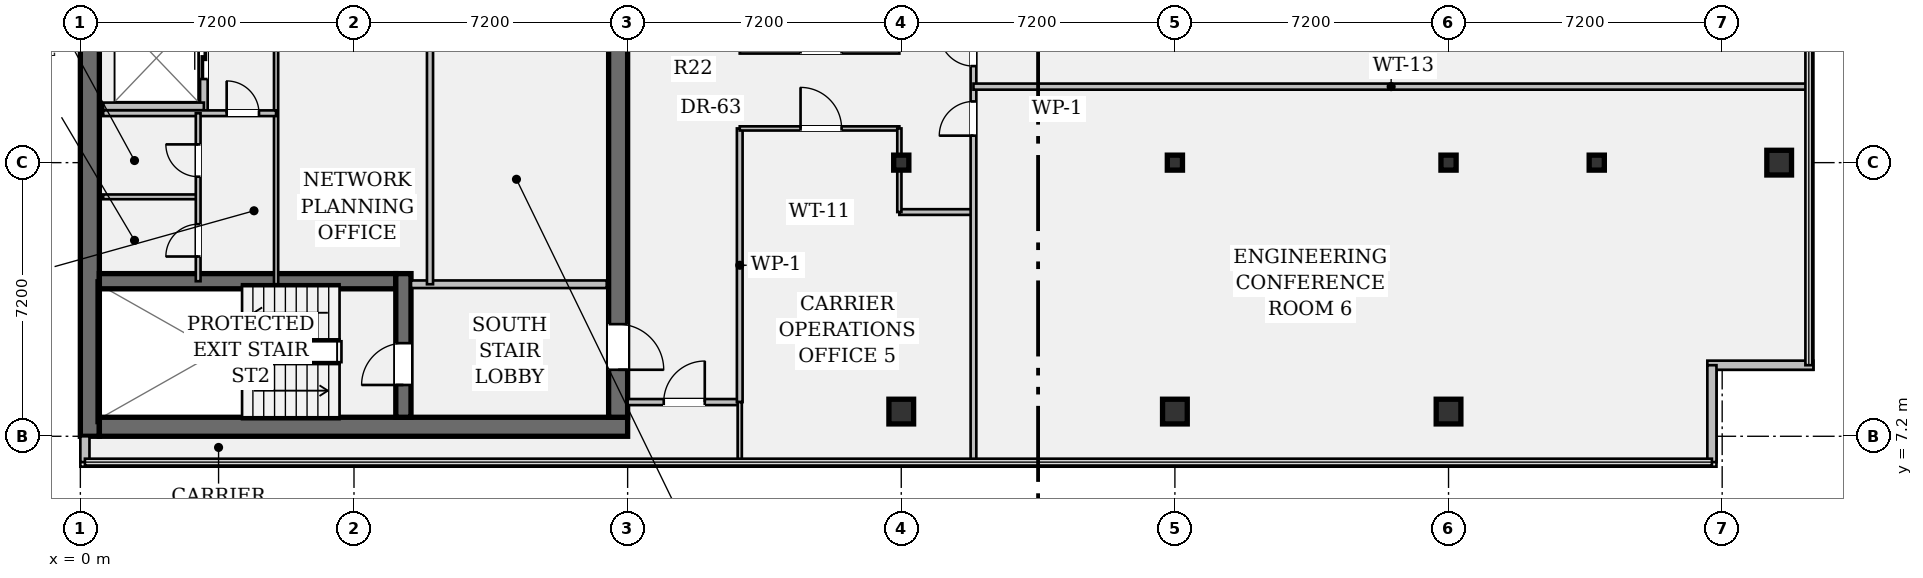
"""IFC4 building model, lengths in metres.
Left out: names, types, materials, properties, quantities, classifications, styles, units other than length and angle.
Written with IfcOpenShell. Run it as: python <this file> out.ifc"""

import sys

from ifc_helpers import new_model, si_unit, direction, frame, frame_2d, origin, origin_2d, place, context, subcontext, project, spatial, rectangle, hollow_rectangle, i_section, extrude, element, fill, save


model = new_model("IFC4")
c1 = context("Model", 3, precision=1e-05, world=origin(), true_north=direction((0.0, 1.0)))
c2 = subcontext(c1, "Body", "Model", "MODEL_VIEW")
j1 = project(units=[si_unit("LENGTHUNIT", "METRE"), si_unit("PLANEANGLEUNIT", "RADIAN")], contexts=[c1])
p1 = place(None, origin())
s1 = spatial("IfcSite", under=j1, at=p1, CompositionType="ELEMENT")
p2 = place(p1, origin())
s2 = spatial("IfcBuilding", under=s1, at=p2, CompositionType="ELEMENT")
p3 = place(p2, frame((0.0, 0.0, 251.65)))
s3 = spatial("IfcBuildingStorey", under=s2, at=p3, CompositionType="ELEMENT", Elevation=251.65)
p4 = place(p3, frame((0.25, 7.2, 0.0), z_axis=(0.0, 0.0, 1.0), x_axis=(0.0, 1.0, 0.0)))
e1 = element("IfcWall", 1, at=p4, inside=s3, PredefinedType="SHEAR", context=c2, shape_type="SweptSolid", body=[
    extrude(rectangle(XDim=28.8, YDim=0.5, at=frame_2d((14.4, 0.0))), origin(), (0.0, 0.0, 1.0), 3.24),
])
p5 = place(p3, frame((0.5, 7.45, 0.0), z_axis=(0.0, 0.0, 1.0), x_axis=(1.0, 0.0, 0.0)))
e2 = element("IfcWall", 2, at=p5, inside=s3, PredefinedType="SHEAR", context=c2, shape_type="SweptSolid", body=[
    extrude(rectangle(XDim=13.9, YDim=0.5, at=frame_2d((6.95, 0.0))), origin(), (0.0, 0.0, 1.0), 3.24),
])
p6 = place(p3, frame((14.15, 35.5, 0.0), z_axis=(0.0, 0.0, 1.0), x_axis=(0.0, -1.0, 0.0)))
e3 = element("IfcWall", 3, at=p6, inside=s3, PredefinedType="SHEAR", context=c2, shape_type="SweptSolid", body=[
    extrude(rectangle(XDim=27.8, YDim=0.5, at=frame_2d((13.9, 0.0))), origin(), (0.0, 0.0, 1.0), 3.24),
])
p7 = place(p6, frame((1.4, 0.0, 0.0)))
e4 = element("IfcOpeningElement", 4, at=p7, cuts=e3, PredefinedType="OPENING", context=c2, shape_type="SweptSolid", body=[
    extrude(rectangle(XDim=1.2, YDim=2.15, at=frame_2d((0.6, 1.075))), frame((0.0, 0.262, 0.0), z_axis=(0.0, -1.0, 0.0), x_axis=(1.0, 0.0, 0.0)), (0.0, 0.0, 1.0), 0.524),
])
p8 = place(p6, frame((25.35, 0.0, 0.0)))
e5 = element("IfcOpeningElement", 5, at=p8, cuts=e3, PredefinedType="OPENING", context=c2, shape_type="SweptSolid", body=[
    extrude(rectangle(XDim=1.2, YDim=2.15, at=frame_2d((0.6, 1.075))), frame((0.0, 0.262, 0.0), z_axis=(0.0, -1.0, 0.0), x_axis=(1.0, 0.0, 0.0)), (0.0, 0.0, 1.0), 0.524),
])
p9 = place(p6, frame((14.7, 0.0, 0.0)))
e6 = element("IfcOpeningElement", 6, at=p9, cuts=e3, PredefinedType="OPENING", context=c2, shape_type="SweptSolid", body=[
    extrude(rectangle(XDim=1.6, YDim=2.2, at=frame_2d((0.8, 1.1))), frame((0.0, 0.262, 0.0), z_axis=(0.0, -1.0, 0.0), x_axis=(1.0, 0.0, 0.0)), (0.0, 0.0, 1.0), 0.524),
])
p10 = place(p3, frame((0.5, 11.28, 0.0), z_axis=(0.0, 0.0, 1.0), x_axis=(1.0, 0.0, 0.0)))
e7 = element("IfcWall", 7, at=p10, inside=s3, PredefinedType="SHEAR", context=c2, shape_type="SweptSolid", body=[
    extrude(rectangle(XDim=7.8, YDim=0.4, at=frame_2d((3.9, 0.0))), origin(), (0.0, 0.0, 1.0), 3.24),
])
p11 = place(p3, frame((8.5, 7.7, 0.0), z_axis=(0.0, 0.0, 1.0), x_axis=(0.0, 1.0, 0.0)))
e8 = element("IfcWall", 8, at=p11, inside=s3, PredefinedType="SHEAR", context=c2, shape_type="SweptSolid", body=[
    extrude(rectangle(XDim=3.78, YDim=0.4, at=frame_2d((1.89, 0.0))), origin(), (0.0, 0.0, 1.0), 3.24),
])
p12 = place(p11, frame((0.85, 0.0, 0.0)))
e9 = element("IfcOpeningElement", 9, at=p12, cuts=e8, PredefinedType="OPENING", context=c2, shape_type="SweptSolid", body=[
    extrude(rectangle(XDim=1.1, YDim=2.15, at=frame_2d((0.55, 1.075))), frame((0.0, 0.212, 0.0), z_axis=(0.0, -1.0, 0.0), x_axis=(1.0, 0.0, 0.0)), (0.0, 0.0, 1.0), 0.424),
])
p13 = place(p3, frame((21.6, 7.85, 0.0), z_axis=(0.0, 0.0, 1.0), x_axis=(1.0, 0.0, 0.0)))
e10 = element("IfcColumn", 10, at=p13, inside=s3, PredefinedType="COLUMN", context=c2, shape_type="SweptSolid", body=[
    extrude(hollow_rectangle(XDim=0.65, YDim=0.65, WallThickness=0.04, at=origin_2d()), origin(), (0.0, 0.0, 1.0), 3.24),
])
p14 = place(p3, frame((21.6, 14.4, 0.0), z_axis=(0.0, 0.0, 1.0), x_axis=(1.0, 0.0, 0.0)))
e11 = element("IfcColumn", 11, at=p14, inside=s3, PredefinedType="COLUMN", context=c2, shape_type="SweptSolid", body=[
    extrude(i_section(OverallWidth=0.399, OverallDepth=0.394, WebThickness=0.023, FlangeThickness=0.037, FilletRadius=0.018, at=origin_2d()), origin(), (0.0, 0.0, 1.0), 3.24),
])
p15 = place(p3, frame((28.8, 7.85, 0.0), z_axis=(0.0, 0.0, 1.0), x_axis=(1.0, 0.0, 0.0)))
e12 = element("IfcColumn", 12, at=p15, inside=s3, PredefinedType="COLUMN", context=c2, shape_type="SweptSolid", body=[
    extrude(hollow_rectangle(XDim=0.65, YDim=0.65, WallThickness=0.04, at=origin_2d()), origin(), (0.0, 0.0, 1.0), 3.24),
])
p16 = place(p3, frame((28.8, 14.4, 0.0), z_axis=(0.0, 0.0, 1.0), x_axis=(1.0, 0.0, 0.0)))
e13 = element("IfcColumn", 13, at=p16, inside=s3, PredefinedType="COLUMN", context=c2, shape_type="SweptSolid", body=[
    extrude(i_section(OverallWidth=0.399, OverallDepth=0.394, WebThickness=0.023, FlangeThickness=0.037, FilletRadius=0.018, at=origin_2d()), origin(), (0.0, 0.0, 1.0), 3.24),
])
p17 = place(p3, frame((36.0, 7.85, 0.0), z_axis=(0.0, 0.0, 1.0), x_axis=(1.0, 0.0, 0.0)))
e14 = element("IfcColumn", 14, at=p17, inside=s3, PredefinedType="COLUMN", context=c2, shape_type="SweptSolid", body=[
    extrude(hollow_rectangle(XDim=0.65, YDim=0.65, WallThickness=0.04, at=origin_2d()), origin(), (0.0, 0.0, 1.0), 3.24),
])
for number, where, z_axis, x_axis in (
    (15, (36.0, 14.4, 0.0), (0.0, 0.0, 1.0), (1.0, 0.0, 0.0)),
    (16, (39.9, 14.4, 0.0), (0.0, 0.0, 1.0), (1.0, 0.0, 0.0)),
):
    element("IfcColumn", number, at=place(p3, frame(where, z_axis=z_axis, x_axis=x_axis)), inside=s3, PredefinedType="COLUMN", context=c2, shape_type="SweptSolid", body=[
        extrude(i_section(OverallWidth=0.399, OverallDepth=0.394, WebThickness=0.023, FlangeThickness=0.037, FilletRadius=0.018, at=origin_2d()), origin(), (0.0, 0.0, 1.0), 3.24),
    ])
p18 = place(p3, frame((44.7, 14.4, 0.0), z_axis=(0.0, 0.0, 1.0), x_axis=(1.0, 0.0, 0.0)))
e17 = element("IfcColumn", 17, at=p18, inside=s3, PredefinedType="COLUMN", context=c2, shape_type="SweptSolid", body=[
    extrude(hollow_rectangle(XDim=0.65, YDim=0.65, WallThickness=0.04, at=origin_2d()), origin(), (0.0, 0.0, 1.0), 3.24),
])
p19 = place(p3, frame((0.12, 6.52, 0.0), z_axis=(0.0, 0.0, 1.0), x_axis=(0.0, 1.0, 0.0)))
e18 = element("IfcWall", 18, at=p19, inside=s3, PredefinedType="STANDARD", context=c2, shape_type="SweptSolid", body=[
    extrude(rectangle(XDim=0.68, YDim=0.24, at=frame_2d((0.34, 0.0))), origin(), (0.0, 0.0, 1.0), 3.24),
])
p20 = place(p3, frame((45.6, 9.07, 0.0), z_axis=(0.0, 0.0, 1.0), x_axis=(-1.0, 0.0, 0.0)))
e19 = element("IfcWall", 19, at=p20, inside=s3, PredefinedType="STANDARD", context=c2, shape_type="SweptSolid", body=[
    extrude(rectangle(XDim=2.79, YDim=0.24, at=frame_2d((1.395, 0.0))), origin(), (0.0, 0.0, 1.0), 3.24),
])
p21 = place(p3, frame((42.93, 9.07, 0.0), z_axis=(0.0, 0.0, 1.0), x_axis=(0.0, -1.0, 0.0)))
e20 = element("IfcWall", 20, at=p21, inside=s3, PredefinedType="STANDARD", context=c2, shape_type="SweptSolid", body=[
    extrude(rectangle(XDim=2.55, YDim=0.24, at=frame_2d((1.275, 0.0))), origin(), (0.0, 0.0, 1.0), 3.24),
])
p22 = place(p3, frame((8.7, 11.2, 0.0), z_axis=(0.0, 0.0, 1.0), x_axis=(1.0, 0.0, 0.0)))
e21 = element("IfcWall", 21, at=p22, inside=s3, PredefinedType="PARTITIONING", context=c2, shape_type="SweptSolid", body=[
    extrude(rectangle(XDim=5.15, YDim=0.2, at=frame_2d((2.575, 0.0))), origin(), (0.0, 0.0, 1.0), 3.24),
])
p23 = place(p3, frame((3.25, 15.7, 0.0), z_axis=(0.0, 0.0, 1.0), x_axis=(0.0, 1.0, 0.0)))
e22 = element("IfcWall", 22, at=p23, inside=s3, PredefinedType="PARTITIONING", context=c2, shape_type="SweptSolid", body=[
    extrude(rectangle(XDim=13.08, YDim=0.2, at=frame_2d((6.54, 0.0))), origin(), (0.0, 0.0, 1.0), 3.24),
])
p24 = place(p23, frame((0.9, 0.0, 0.0)))
e23 = element("IfcOpeningElement", 23, at=p24, cuts=e22, PredefinedType="OPENING", context=c2, shape_type="SweptSolid", body=[
    extrude(rectangle(XDim=1.1, YDim=2.2, at=frame_2d((0.55, 1.1))), frame((0.0, 0.112, 0.0), z_axis=(0.0, -1.0, 0.0), x_axis=(1.0, 0.0, 0.0)), (0.0, 0.0, 1.0), 0.224),
])
p25 = place(p23, frame((3.5, 0.0, 0.0)))
e24 = element("IfcOpeningElement", 24, at=p25, cuts=e22, PredefinedType="OPENING", context=c2, shape_type="SweptSolid", body=[
    extrude(rectangle(XDim=1.1, YDim=2.2, at=frame_2d((0.55, 1.1))), frame((0.0, 0.112, 0.0), z_axis=(0.0, -1.0, 0.0), x_axis=(1.0, 0.0, 0.0)), (0.0, 0.0, 1.0), 0.224),
])
p26 = place(p23, frame((7.2, 0.0, 0.0)))
e25 = element("IfcOpeningElement", 25, at=p26, cuts=e22, PredefinedType="OPENING", context=c2, shape_type="SweptSolid", body=[
    extrude(rectangle(XDim=1.1, YDim=2.2, at=frame_2d((0.55, 1.1))), frame((0.0, 0.112, 0.0), z_axis=(0.0, -1.0, 0.0), x_axis=(1.0, 0.0, 0.0)), (0.0, 0.0, 1.0), 0.224),
])
p27 = place(p23, frame((9.8, 0.0, 0.0)))
e26 = element("IfcOpeningElement", 26, at=p27, cuts=e22, PredefinedType="OPENING", context=c2, shape_type="SweptSolid", body=[
    extrude(rectangle(XDim=1.1, YDim=2.2, at=frame_2d((0.55, 1.1))), frame((0.0, 0.112, 0.0), z_axis=(0.0, -1.0, 0.0), x_axis=(1.0, 0.0, 0.0)), (0.0, 0.0, 1.0), 0.224),
])
p28 = place(p3, frame((0.6, 15.88, 0.0), z_axis=(0.0, 0.0, 1.0), x_axis=(1.0, 0.0, 0.0)))
e27 = element("IfcWall", 27, at=p28, inside=s3, PredefinedType="PARTITIONING", context=c2, shape_type="SweptSolid", body=[
    extrude(rectangle(XDim=2.65, YDim=0.2, at=frame_2d((1.325, 0.0))), origin(), (0.0, 0.0, 1.0), 3.24),
])
p29 = place(p3, frame((5.15, 11.2, 0.0), z_axis=(0.0, 0.0, 1.0), x_axis=(0.0, 1.0, 0.0)))
e28 = element("IfcWall", 28, at=p29, inside=s3, PredefinedType="PARTITIONING", context=c2, shape_type="SweptSolid", body=[
    extrude(rectangle(XDim=6.6, YDim=0.11, at=frame_2d((3.3, 0.0))), origin(), (0.0, 0.0, 1.0), 3.24),
])
p30 = place(p3, frame((9.2, 11.2, 0.0), z_axis=(0.0, 0.0, 1.0), x_axis=(0.0, 1.0, 0.0)))
e29 = element("IfcWall", 29, at=p30, inside=s3, PredefinedType="PARTITIONING", context=c2, shape_type="SweptSolid", body=[
    extrude(rectangle(XDim=6.6, YDim=0.16, at=frame_2d((3.3, 0.0))), origin(), (0.0, 0.0, 1.0), 3.24),
])
p31 = place(p3, frame((0.6, 15.7, 0.0), z_axis=(0.0, 0.0, 1.0), x_axis=(1.0, 0.0, 0.0)))
e30 = element("IfcWall", 30, at=p31, inside=s3, PredefinedType="PARTITIONING", context=c2, shape_type="SweptSolid", body=[
    extrude(rectangle(XDim=4.55, YDim=0.15, at=frame_2d((2.275, 0.0))), origin(), (0.0, 0.0, 1.0), 3.24),
])
p32 = place(p31, frame((3.25, 0.0, 0.0)))
e31 = element("IfcOpeningElement", 31, at=p32, cuts=e30, PredefinedType="OPENING", context=c2, shape_type="SweptSolid", body=[
    extrude(rectangle(XDim=0.85, YDim=2.15, at=frame_2d((0.425, 1.075))), frame((0.0, 0.087, 0.0), z_axis=(0.0, -1.0, 0.0), x_axis=(1.0, 0.0, 0.0)), (0.0, 0.0, 1.0), 0.174),
])
p33 = place(p3, frame((0.6, 13.5, 0.0), z_axis=(0.0, 0.0, 1.0), x_axis=(1.0, 0.0, 0.0)))
e32 = element("IfcWall", 32, at=p33, inside=s3, PredefinedType="PARTITIONING", context=c2, shape_type="SweptSolid", body=[
    extrude(rectangle(XDim=2.5, YDim=0.125, at=frame_2d((1.25, 0.0))), origin(), (0.0, 0.0, 1.0), 3.24),
])
p34 = place(p3, frame((3.1, 11.28, 0.0), z_axis=(0.0, 0.0, 1.0), x_axis=(0.0, 1.0, 0.0)))
e33 = element("IfcWall", 33, at=p34, inside=s3, PredefinedType="PARTITIONING", context=c2, shape_type="SweptSolid", body=[
    extrude(rectangle(XDim=4.42, YDim=0.125, at=frame_2d((2.21, 0.0))), origin(), (0.0, 0.0, 1.0), 3.24),
])
p35 = place(p34, frame((0.65, 0.0, 0.0)))
e34 = element("IfcOpeningElement", 34, at=p35, cuts=e33, PredefinedType="OPENING", context=c2, shape_type="SweptSolid", body=[
    extrude(rectangle(XDim=0.85, YDim=2.15, at=frame_2d((0.425, 1.075))), frame((0.0, 0.074, 0.0), z_axis=(0.0, -1.0, 0.0), x_axis=(1.0, 0.0, 0.0)), (0.0, 0.0, 1.0), 0.149),
])
p36 = place(p34, frame((2.75, 0.0, 0.0)))
e35 = element("IfcOpeningElement", 35, at=p36, cuts=e33, PredefinedType="OPENING", context=c2, shape_type="SweptSolid", body=[
    extrude(rectangle(XDim=0.85, YDim=2.15, at=frame_2d((0.425, 1.075))), frame((0.0, 0.074, 0.0), z_axis=(0.0, -1.0, 0.0), x_axis=(1.0, 0.0, 0.0)), (0.0, 0.0, 1.0), 0.149),
])
p37 = place(p3, frame((14.4, 8.1, 0.0), z_axis=(0.0, 0.0, 1.0), x_axis=(1.0, 0.0, 0.0)))
e36 = element("IfcWall", 36, at=p37, inside=s3, PredefinedType="PARTITIONING", context=c2, shape_type="SweptSolid", body=[
    extrude(rectangle(XDim=2.95, YDim=0.16, at=frame_2d((1.475, 0.0))), origin(), (0.0, 0.0, 1.0), 3.24),
])
p38 = place(p37, frame((0.95, 0.0, 0.0)))
e37 = element("IfcOpeningElement", 37, at=p38, cuts=e36, PredefinedType="OPENING", context=c2, shape_type="SweptSolid", body=[
    extrude(rectangle(XDim=1.08, YDim=2.15, at=frame_2d((0.54, 1.075))), frame((0.0, 0.092, 0.0), z_axis=(0.0, -1.0, 0.0), x_axis=(1.0, 0.0, 0.0)), (0.0, 0.0, 1.0), 0.184),
])
p39 = place(p3, frame((17.35, 8.1, 0.0), z_axis=(0.0, 0.0, 1.0), x_axis=(0.0, 1.0, 0.0)))
e38 = element("IfcWall", 38, at=p39, inside=s3, PredefinedType="PARTITIONING", context=c2, shape_type="SweptSolid", body=[
    extrude(rectangle(XDim=7.2, YDim=0.15, at=frame_2d((3.6, 0.0))), origin(), (0.0, 0.0, 1.0), 2.676),
])
p40 = place(p3, frame((17.35, 15.3, 0.0), z_axis=(0.0, 0.0, 1.0), x_axis=(1.0, 0.0, 0.0)))
e39 = element("IfcWall", 39, at=p40, inside=s3, PredefinedType="PARTITIONING", context=c2, shape_type="SweptSolid", body=[
    extrude(rectangle(XDim=4.2, YDim=0.11, at=frame_2d((2.1, 0.0))), origin(), (0.0, 0.0, 1.0), 2.808),
])
p41 = place(p40, frame((1.6, 0.0, 0.0)))
e40 = element("IfcOpeningElement", 40, at=p41, cuts=e39, PredefinedType="OPENING", context=c2, shape_type="SweptSolid", body=[
    extrude(rectangle(XDim=1.08, YDim=2.15, at=frame_2d((0.54, 1.075))), frame((0.0, 0.067, 0.0), z_axis=(0.0, -1.0, 0.0), x_axis=(1.0, 0.0, 0.0)), (0.0, 0.0, 1.0), 0.134),
])
p42 = place(p3, frame((17.35, 17.35, 0.0), z_axis=(0.0, 0.0, 1.0), x_axis=(1.0, 0.0, 0.0)))
e41 = element("IfcWall", 41, at=p42, inside=s3, PredefinedType="PARTITIONING", context=c2, shape_type="SweptSolid", body=[
    extrude(rectangle(XDim=4.2, YDim=0.16, at=frame_2d((2.1, 0.0))), origin(), (0.0, 0.0, 1.0), 2.808),
])
p43 = place(p42, frame((1.6, 0.0, 0.0)))
e42 = element("IfcOpeningElement", 42, at=p43, cuts=e41, PredefinedType="OPENING", context=c2, shape_type="SweptSolid", body=[
    extrude(rectangle(XDim=1.08, YDim=2.15, at=frame_2d((0.54, 1.075))), frame((0.0, 0.092, 0.0), z_axis=(0.0, -1.0, 0.0), x_axis=(1.0, 0.0, 0.0)), (0.0, 0.0, 1.0), 0.184),
])
p44 = place(p3, frame((21.55, 13.1, 0.0), z_axis=(0.0, 0.0, 1.0), x_axis=(1.0, 0.0, 0.0)))
e43 = element("IfcWall", 43, at=p44, inside=s3, PredefinedType="PARTITIONING", context=c2, shape_type="SweptSolid", body=[
    extrude(rectangle(XDim=1.95, YDim=0.15, at=frame_2d((0.975, 0.0))), origin(), (0.0, 0.0, 1.0), 2.676),
])
p45 = place(p3, frame((21.55, 13.1, 0.0), z_axis=(0.0, 0.0, 1.0), x_axis=(0.0, 1.0, 0.0)))
e44 = element("IfcWall", 44, at=p45, inside=s3, PredefinedType="PARTITIONING", context=c2, shape_type="SweptSolid", body=[
    extrude(rectangle(XDim=2.2, YDim=0.11, at=frame_2d((1.1, 0.0))), origin(), (0.0, 0.0, 1.0), 2.676),
])
p46 = place(p3, frame((23.5, 6.52, 0.0), z_axis=(0.0, 0.0, 1.0), x_axis=(0.0, 1.0, 0.0)))
e45 = element("IfcWall", 45, at=p46, inside=s3, PredefinedType="PARTITIONING", context=c2, shape_type="SweptSolid", body=[
    extrude(rectangle(XDim=18.56, YDim=0.15, at=frame_2d((9.28, 0.0))), origin(), (0.0, 0.0, 1.0), 2.676),
])
p47 = place(p46, frame((8.59, 0.0, 0.0)))
e46 = element("IfcOpeningElement", 46, at=p47, cuts=e45, PredefinedType="OPENING", context=c2, shape_type="SweptSolid", body=[
    extrude(rectangle(XDim=0.9, YDim=2.15, at=frame_2d((0.45, 1.075))), frame((0.0, 0.087, 0.0), z_axis=(0.0, -1.0, 0.0), x_axis=(1.0, 0.0, 0.0)), (0.0, 0.0, 1.0), 0.174),
])
p48 = place(p46, frame((10.42, 0.0, 0.0)))
e47 = element("IfcOpeningElement", 47, at=p48, cuts=e45, PredefinedType="OPENING", context=c2, shape_type="SweptSolid", body=[
    extrude(rectangle(XDim=0.9, YDim=2.15, at=frame_2d((0.45, 1.075))), frame((0.0, 0.087, 0.0), z_axis=(0.0, -1.0, 0.0), x_axis=(1.0, 0.0, 0.0)), (0.0, 0.0, 1.0), 0.174),
])
p49 = place(p3, frame((17.35, 6.52, 0.0), z_axis=(0.0, 0.0, 1.0), x_axis=(0.0, 1.0, 0.0)))
e48 = element("IfcWall", 48, at=p49, inside=s3, PredefinedType="PARTITIONING", context=c2, shape_type="SweptSolid", body=[
    extrude(rectangle(XDim=1.58, YDim=0.11, at=frame_2d((0.79, 0.0))), origin(), (0.0, 0.0, 1.0), 3.24),
])
p50 = place(p3, frame((23.5, 16.4, 0.0), z_axis=(0.0, 0.0, 1.0), x_axis=(1.0, 0.0, 0.0)))
e49 = element("IfcWall", 49, at=p50, inside=s3, PredefinedType="PARTITIONING", context=c2, shape_type="SweptSolid", body=[
    extrude(rectangle(XDim=21.98, YDim=0.16, at=frame_2d((10.99, 0.0))), origin(), (0.0, 0.0, 1.0), 2.676),
])
p51 = place(p12, origin())
e50 = element("IfcDoor", 50, at=p51, inside=s3, OperationType="SINGLE_SWING_LEFT", PredefinedType="DOOR", context=c2, shape_type="SweptSolid", body=[
    extrude(rectangle(XDim=1.1, YDim=2.15, at=frame_2d((0.55, 1.075))), frame((0.0, 0.025, 0.0), z_axis=(0.0, -1.0, 0.0), x_axis=(1.0, 0.0, 0.0)), (0.0, 0.0, 1.0), 0.05),
])
fill(e9, e50)
p52 = place(p8, origin())
e51 = element("IfcDoor", 51, at=p52, inside=s3, OperationType="SINGLE_SWING_RIGHT", PredefinedType="DOOR", context=c2, shape_type="SweptSolid", body=[
    extrude(rectangle(XDim=1.2, YDim=2.15, at=frame_2d((0.6, 1.075))), frame((0.0, 0.025, 0.0), z_axis=(0.0, -1.0, 0.0), x_axis=(1.0, 0.0, 0.0)), (0.0, 0.0, 1.0), 0.05),
])
fill(e5, e51)
p53 = place(p24, origin())
e52 = element("IfcDoor", 52, at=p53, inside=s3, OperationType="DOUBLE_DOOR_SLIDING", PredefinedType="DOOR", context=c2, shape_type="SweptSolid", body=[
    extrude(rectangle(XDim=1.1, YDim=2.2, at=frame_2d((0.55, 1.1))), frame((0.0, 0.025, 0.0), z_axis=(0.0, -1.0, 0.0), x_axis=(1.0, 0.0, 0.0)), (0.0, 0.0, 1.0), 0.05),
])
fill(e23, e52)
p54 = place(p32, origin())
e53 = element("IfcDoor", 53, at=p54, inside=s3, OperationType="SINGLE_SWING_LEFT", PredefinedType="DOOR", context=c2, shape_type="SweptSolid", body=[
    extrude(rectangle(XDim=0.85, YDim=2.15, at=frame_2d((0.425, 1.075))), frame((0.0, 0.025, 0.0), z_axis=(0.0, -1.0, 0.0), x_axis=(1.0, 0.0, 0.0)), (0.0, 0.0, 1.0), 0.05),
])
fill(e31, e53)
p55 = place(p35, origin())
e54 = element("IfcDoor", 54, at=p55, inside=s3, OperationType="SINGLE_SWING_LEFT", PredefinedType="DOOR", context=c2, shape_type="SweptSolid", body=[
    extrude(rectangle(XDim=0.85, YDim=2.15, at=frame_2d((0.425, 1.075))), frame((0.0, 0.025, 0.0), z_axis=(0.0, -1.0, 0.0), x_axis=(1.0, 0.0, 0.0)), (0.0, 0.0, 1.0), 0.05),
])
fill(e34, e54)
p56 = place(p36, origin())
e55 = element("IfcDoor", 55, at=p56, inside=s3, OperationType="SINGLE_SWING_RIGHT", PredefinedType="DOOR", context=c2, shape_type="SweptSolid", body=[
    extrude(rectangle(XDim=0.85, YDim=2.15, at=frame_2d((0.425, 1.075))), frame((0.0, 0.025, 0.0), z_axis=(0.0, -1.0, 0.0), x_axis=(1.0, 0.0, 0.0)), (0.0, 0.0, 1.0), 0.05),
])
fill(e35, e55)
p57 = place(p38, origin())
e56 = element("IfcDoor", 56, at=p57, inside=s3, OperationType="SINGLE_SWING_RIGHT", PredefinedType="DOOR", context=c2, shape_type="SweptSolid", body=[
    extrude(rectangle(XDim=1.08, YDim=2.15, at=frame_2d((0.54, 1.075))), frame((0.0, 0.025, 0.0), z_axis=(0.0, -1.0, 0.0), x_axis=(1.0, 0.0, 0.0)), (0.0, 0.0, 1.0), 0.05),
])
fill(e37, e56)
p58 = place(p41, origin())
e57 = element("IfcDoor", 57, at=p58, inside=s3, OperationType="SINGLE_SWING_LEFT", PredefinedType="DOOR", context=c2, shape_type="SweptSolid", body=[
    extrude(rectangle(XDim=1.08, YDim=2.15, at=frame_2d((0.54, 1.075))), frame((0.0, 0.025, 0.0), z_axis=(0.0, -1.0, 0.0), x_axis=(1.0, 0.0, 0.0)), (0.0, 0.0, 1.0), 0.05),
])
fill(e40, e57)
p59 = place(p47, origin())
e58 = element("IfcDoor", 58, at=p59, inside=s3, OperationType="SINGLE_SWING_LEFT", PredefinedType="DOOR", context=c2, shape_type="SweptSolid", body=[
    extrude(rectangle(XDim=0.9, YDim=2.15, at=frame_2d((0.45, 1.075))), frame((0.0, 0.025, 0.0), z_axis=(0.0, -1.0, 0.0), x_axis=(1.0, 0.0, 0.0)), (0.0, 0.0, 1.0), 0.05),
])
fill(e46, e58)
p60 = place(p48, origin())
e59 = element("IfcDoor", 59, at=p60, inside=s3, OperationType="SINGLE_SWING_RIGHT", PredefinedType="DOOR", context=c2, shape_type="SweptSolid", body=[
    extrude(rectangle(XDim=0.9, YDim=2.15, at=frame_2d((0.45, 1.075))), frame((0.0, 0.025, 0.0), z_axis=(0.0, -1.0, 0.0), x_axis=(1.0, 0.0, 0.0)), (0.0, 0.0, 1.0), 0.05),
])
fill(e47, e59)
save(model, sys.argv[1])
